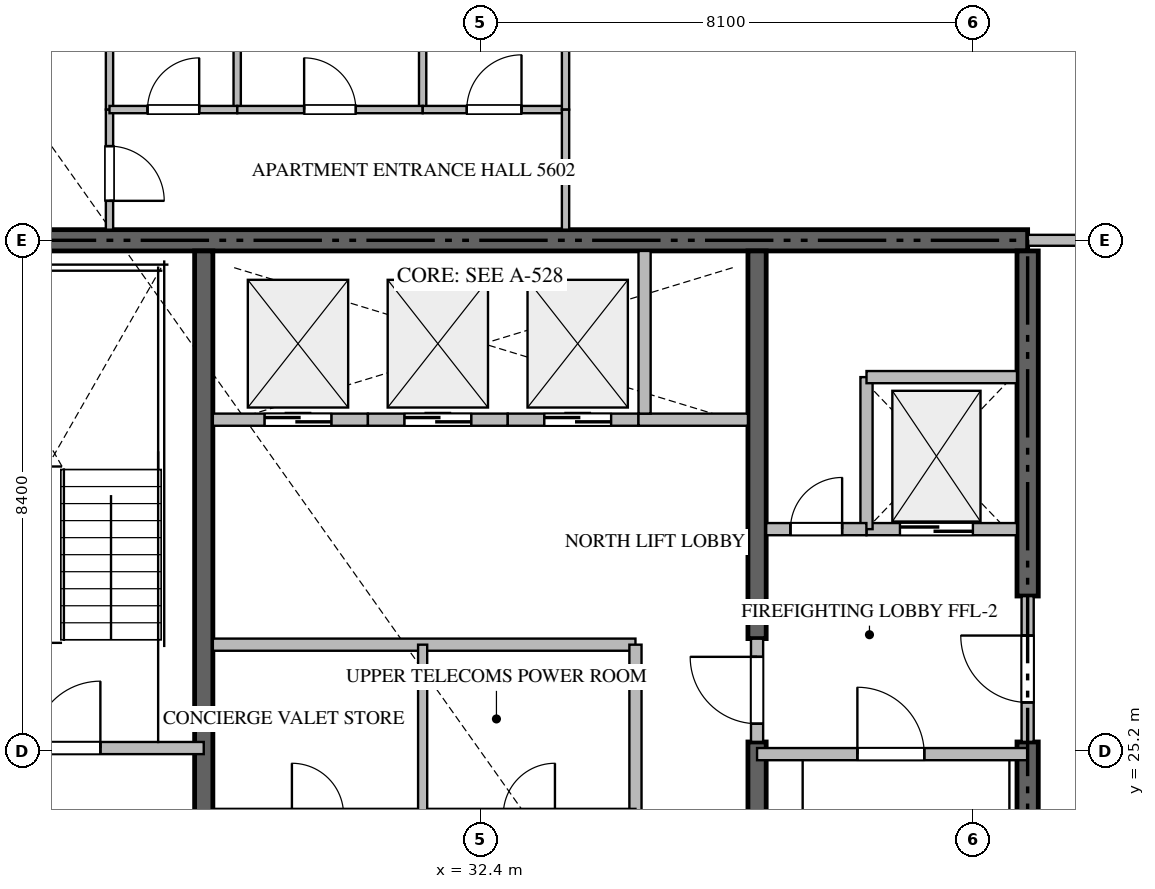
"""IFC4 building model, lengths in metres.
Left out: names, types, materials, properties, quantities, classifications, styles, units other than length and angle.
Written with IfcOpenShell. Run it as: python <this file> out.ifc"""

import sys

from ifc_helpers import new_model, si_unit, direction, frame, frame_2d, origin, place, context, subcontext, project, spatial, rectangle, extrude, source, transform, mapped, element, fill, save


model = new_model("IFC4")
c1 = context("Model", 3, precision=1e-05, world=origin(), true_north=direction((0.0, 1.0)))
c2 = subcontext(c1, "Body", "Model", "MODEL_VIEW")
j1 = project(units=[si_unit("LENGTHUNIT", "METRE"), si_unit("PLANEANGLEUNIT", "RADIAN")], contexts=[c1])
p1 = place(None, origin())
s1 = spatial("IfcSite", under=j1, at=p1, CompositionType="ELEMENT")
p2 = place(p1, origin())
s2 = spatial("IfcBuilding", under=s1, at=p2, CompositionType="ELEMENT")
p3 = place(p2, frame((0.0, 0.0, 225.85)))
s3 = spatial("IfcBuildingStorey", under=s2, at=p3, CompositionType="ELEMENT", Elevation=225.85)
p4 = place(p3, frame((41.4, 33.6, -0.26), z_axis=(0.0, 0.0, 1.0), x_axis=(-1.0, 0.0, 0.0)))
e1 = element("IfcWall", 1, at=p4, inside=s3, PredefinedType="SHEAR", context=c2, shape_type="SweptSolid", body=[
    extrude(rectangle(XDim=18.0, YDim=0.35, at=frame_2d((9.0, 0.0))), origin(), (0.0, 0.0, 1.0), 3.848),
])
p5 = place(p3, frame((41.4, 16.975, -0.26), z_axis=(0.0, 0.0, 1.0), x_axis=(0.0, 1.0, 0.0)))
e2 = element("IfcWall", 2, at=p5, inside=s3, PredefinedType="SHEAR", context=c2, shape_type="SweptSolid", body=[
    extrude(rectangle(XDim=8.375, YDim=0.35, at=frame_2d((4.188, 0.0))), origin(), (0.0, 0.0, 1.0), 3.848),
])
p6 = place(p3, frame((41.4, 27.75, -0.26), z_axis=(0.0, 0.0, 1.0), x_axis=(0.0, 1.0, 0.0)))
e3 = element("IfcWall", 3, at=p6, inside=s3, PredefinedType="SHEAR", context=c2, shape_type="SweptSolid", body=[
    extrude(rectangle(XDim=5.675, YDim=0.35, at=frame_2d((2.837, 0.0))), origin(), (0.0, 0.0, 1.0), 3.848),
])
p7 = place(p3, frame((27.85, 23.55, -0.26), z_axis=(0.0, 0.0, 1.0), x_axis=(0.0, 1.0, 0.0)))
e4 = element("IfcWall", 4, at=p7, inside=s3, PredefinedType="SHEAR", context=c2, shape_type="SweptSolid", body=[
    extrude(rectangle(XDim=9.875, YDim=0.3, at=frame_2d((4.938, 0.0))), origin(), (0.0, 0.0, 1.0), 3.848),
])
p8 = place(p3, frame((36.95, 16.975, -0.26), z_axis=(0.0, 0.0, 1.0), x_axis=(0.0, 1.0, 0.0)))
e5 = element("IfcWall", 5, at=p8, inside=s3, PredefinedType="SHEAR", context=c2, shape_type="SweptSolid", body=[
    extrude(rectangle(XDim=8.375, YDim=0.3, at=frame_2d((4.188, 0.0))), origin(), (0.0, 0.0, 1.0), 3.848),
])
p9 = place(p3, frame((36.95, 27.05, -0.26), z_axis=(0.0, 0.0, 1.0), x_axis=(0.0, 1.0, 0.0)))
e6 = element("IfcWall", 6, at=p9, inside=s3, PredefinedType="SHEAR", context=c2, shape_type="SweptSolid", body=[
    extrude(rectangle(XDim=6.375, YDim=0.3, at=frame_2d((3.188, 0.0))), origin(), (0.0, 0.0, 1.0), 3.848),
])
p10 = place(p3, frame((23.4, 25.25, 0.0), z_axis=(0.0, 0.0, 1.0), x_axis=(1.0, 0.0, 0.0)))
e7 = element("IfcWall", 7, at=p10, inside=s3, PredefinedType="STANDARD", context=c2, shape_type="SweptSolid", body=[
    extrude(rectangle(XDim=4.45, YDim=0.2, at=frame_2d((2.225, 0.0))), origin(), (0.0, 0.0, 1.0), 3.59),
])
p11 = place(p10, frame((1.65, 0.0, 0.0)))
e8 = element("IfcOpeningElement", 8, at=p11, cuts=e7, PredefinedType="OPENING", context=c2, shape_type="SweptSolid", body=[
    extrude(rectangle(XDim=1.1, YDim=2.15, at=frame_2d((0.55, 1.075))), frame((0.0, 0.11, 0.0), z_axis=(0.0, -1.0, 0.0), x_axis=(1.0, 0.0, 0.0)), (0.0, 0.0, 1.0), 0.22),
])
p12 = place(p3, frame((36.95, 25.15, 0.0), z_axis=(0.0, 0.0, 1.0), x_axis=(1.0, 0.0, 0.0)))
e9 = element("IfcWall", 9, at=p12, inside=s3, PredefinedType="STANDARD", context=c2, shape_type="SweptSolid", body=[
    extrude(rectangle(XDim=4.45, YDim=0.2, at=frame_2d((2.225, 0.0))), origin(), (0.0, 0.0, 1.0), 3.59),
])
p13 = place(p12, frame((1.65, 0.0, 0.0)))
e10 = element("IfcOpeningElement", 10, at=p13, cuts=e9, PredefinedType="OPENING", context=c2, shape_type="SweptSolid", body=[
    extrude(rectangle(XDim=1.1, YDim=2.15, at=frame_2d((0.55, 1.075))), frame((0.0, 0.11, 0.0), z_axis=(0.0, -1.0, 0.0), x_axis=(1.0, 0.0, 0.0)), (0.0, 0.0, 1.0), 0.22),
])
p14 = place(p3, frame((38.75, 28.85, 0.0), z_axis=(0.0, 0.0, 1.0), x_axis=(1.0, 0.0, 0.0)))
e11 = element("IfcWall", 11, at=p14, inside=s3, PredefinedType="STANDARD", context=c2, shape_type="SweptSolid", body=[
    extrude(rectangle(XDim=2.475, YDim=0.2, at=frame_2d((1.238, 0.0))), origin(), (0.0, 0.0, 1.0), 3.59),
])
p15 = place(p14, frame((0.55, 0.0, 0.0)))
e12 = element("IfcOpeningElement", 12, at=p15, cuts=e11, PredefinedType="OPENING", context=c2, shape_type="SweptSolid", body=[
    extrude(rectangle(XDim=1.2, YDim=2.2, at=frame_2d((0.6, 1.1))), frame((0.0, 0.11, 0.0), z_axis=(0.0, -1.0, 0.0), x_axis=(1.0, 0.0, 0.0)), (0.0, 0.0, 1.0), 0.22),
])
p16 = place(p3, frame((28.0, 30.65, 0.0), z_axis=(0.0, 0.0, 1.0), x_axis=(1.0, 0.0, 0.0)))
e13 = element("IfcWall", 13, at=p16, inside=s3, PredefinedType="STANDARD", context=c2, shape_type="SweptSolid", body=[
    extrude(rectangle(XDim=2.55, YDim=0.2, at=frame_2d((1.275, 0.0))), origin(), (0.0, 0.0, 1.0), 3.59),
])
p17 = place(p16, frame((0.85, 0.0, 0.0)))
e14 = element("IfcOpeningElement", 14, at=p17, cuts=e13, PredefinedType="OPENING", context=c2, shape_type="SweptSolid", body=[
    extrude(rectangle(XDim=1.1, YDim=2.2, at=frame_2d((0.55, 1.1))), frame((0.0, 0.11, 0.0), z_axis=(0.0, -1.0, 0.0), x_axis=(1.0, 0.0, 0.0)), (0.0, 0.0, 1.0), 0.22),
])
p18 = place(p3, frame((30.55, 30.65, 0.0), z_axis=(0.0, 0.0, 1.0), x_axis=(1.0, 0.0, 0.0)))
e15 = element("IfcWall", 15, at=p18, inside=s3, PredefinedType="STANDARD", context=c2, shape_type="SweptSolid", body=[
    extrude(rectangle(XDim=2.3, YDim=0.2, at=frame_2d((1.15, 0.0))), origin(), (0.0, 0.0, 1.0), 3.59),
])
p19 = place(p18, frame((0.6, 0.0, 0.0)))
e16 = element("IfcOpeningElement", 16, at=p19, cuts=e15, PredefinedType="OPENING", context=c2, shape_type="SweptSolid", body=[
    extrude(rectangle(XDim=1.1, YDim=2.2, at=frame_2d((0.55, 1.1))), frame((0.0, 0.11, 0.0), z_axis=(0.0, -1.0, 0.0), x_axis=(1.0, 0.0, 0.0)), (0.0, 0.0, 1.0), 0.22),
])
p20 = place(p3, frame((32.85, 30.65, 0.0), z_axis=(0.0, 0.0, 1.0), x_axis=(1.0, 0.0, 0.0)))
e17 = element("IfcWall", 17, at=p20, inside=s3, PredefinedType="STANDARD", context=c2, shape_type="SweptSolid", body=[
    extrude(rectangle(XDim=2.15, YDim=0.2, at=frame_2d((1.075, 0.0))), origin(), (0.0, 0.0, 1.0), 3.59),
])
p21 = place(p20, frame((0.6, 0.0, 0.0)))
e18 = element("IfcOpeningElement", 18, at=p21, cuts=e17, PredefinedType="OPENING", context=c2, shape_type="SweptSolid", body=[
    extrude(rectangle(XDim=1.1, YDim=2.2, at=frame_2d((0.55, 1.1))), frame((0.0, 0.11, 0.0), z_axis=(0.0, -1.0, 0.0), x_axis=(1.0, 0.0, 0.0)), (0.0, 0.0, 1.0), 0.22),
])
p22 = place(p3, frame((35.0, 30.65, 0.0), z_axis=(0.0, 0.0, 1.0), x_axis=(1.0, 0.0, 0.0)))
e19 = element("IfcWall", 19, at=p22, inside=s3, PredefinedType="STANDARD", context=c2, shape_type="SweptSolid", body=[
    extrude(rectangle(XDim=1.8, YDim=0.2, at=frame_2d((0.9, 0.0))), origin(), (0.0, 0.0, 1.0), 3.59),
])
p23 = place(p3, frame((35.1, 30.75, 0.0), z_axis=(0.0, 0.0, 1.0), x_axis=(0.0, 1.0, 0.0)))
e20 = element("IfcWall", 20, at=p23, inside=s3, PredefinedType="STANDARD", context=c2, shape_type="SweptSolid", body=[
    extrude(rectangle(XDim=2.675, YDim=0.2, at=frame_2d((1.337, 0.0))), origin(), (0.0, 0.0, 1.0), 3.59),
])
p24 = place(p3, frame((38.75, 28.85, 0.0), z_axis=(0.0, 0.0, 1.0), x_axis=(0.0, 1.0, 0.0)))
e21 = element("IfcWall", 21, at=p24, inside=s3, PredefinedType="STANDARD", context=c2, shape_type="SweptSolid", body=[
    extrude(rectangle(XDim=2.5, YDim=0.2, at=frame_2d((1.25, 0.0))), origin(), (0.0, 0.0, 1.0), 3.59),
])
p25 = place(p3, frame((38.75, 31.35, 0.0), z_axis=(0.0, 0.0, 1.0), x_axis=(1.0, 0.0, 0.0)))
e22 = element("IfcWall", 22, at=p25, inside=s3, PredefinedType="STANDARD", context=c2, shape_type="SweptSolid", body=[
    extrude(rectangle(XDim=2.475, YDim=0.2, at=frame_2d((1.238, 0.0))), origin(), (0.0, 0.0, 1.0), 3.59),
])
p26 = place(p3, frame((37.1, 28.85, 0.0), z_axis=(0.0, 0.0, 1.0), x_axis=(1.0, 0.0, 0.0)))
e23 = element("IfcWall", 23, at=p26, inside=s3, PredefinedType="STANDARD", context=c2, shape_type="SweptSolid", body=[
    extrude(rectangle(XDim=1.648, YDim=0.2, at=frame_2d((0.824, 0.0))), origin(), (0.0, 0.0, 1.0), 3.59),
])
p27 = place(p26, frame((0.399, 0.0, 0.0)))
e24 = element("IfcOpeningElement", 24, at=p27, cuts=e23, PredefinedType="OPENING", context=c2, shape_type="SweptSolid", body=[
    extrude(rectangle(XDim=0.85, YDim=2.1, at=frame_2d((0.425, 1.05))), frame((0.0, 0.11, 0.0), z_axis=(0.0, -1.0, 0.0), x_axis=(1.0, 0.0, 0.0)), (0.0, 0.0, 1.0), 0.22),
])
p28 = place(p3, frame((41.4, 25.352, 0.0), z_axis=(0.0, 0.0, 1.0), x_axis=(0.0, 1.0, 0.0)))
e25 = element("IfcWall", 25, at=p28, inside=s3, PredefinedType="STANDARD", context=c2, shape_type="SweptSolid", body=[
    extrude(rectangle(XDim=2.396, YDim=0.2, at=frame_2d((1.198, 0.0))), origin(), (0.0, 0.0, 1.0), 3.59),
])
p29 = place(p28, frame((0.648, 0.0, 0.0)))
e26 = element("IfcOpeningElement", 26, at=p29, cuts=e25, PredefinedType="OPENING", context=c2, shape_type="SweptSolid", body=[
    extrude(rectangle(XDim=1.1, YDim=2.15, at=frame_2d((0.55, 1.075))), frame((0.0, 0.11, 0.0), z_axis=(0.0, -1.0, 0.0), x_axis=(1.0, 0.0, 0.0)), (0.0, 0.0, 1.0), 0.22),
])
p30 = place(p3, frame((36.95, 25.352, 0.0), z_axis=(0.0, 0.0, 1.0), x_axis=(0.0, 1.0, 0.0)))
e27 = element("IfcWall", 27, at=p30, inside=s3, PredefinedType="STANDARD", context=c2, shape_type="SweptSolid", body=[
    extrude(rectangle(XDim=1.696, YDim=0.2, at=frame_2d((0.848, 0.0))), origin(), (0.0, 0.0, 1.0), 3.59),
])
p31 = place(p30, frame((0.298, 0.0, 0.0)))
e28 = element("IfcOpeningElement", 28, at=p31, cuts=e27, PredefinedType="OPENING", context=c2, shape_type="SweptSolid", body=[
    extrude(rectangle(XDim=1.1, YDim=2.15, at=frame_2d((0.55, 1.075))), frame((0.0, 0.11, 0.0), z_axis=(0.0, -1.0, 0.0), x_axis=(1.0, 0.0, 0.0)), (0.0, 0.0, 1.0), 0.22),
])
p32 = place(p3, frame((28.0, 26.95, 0.0), z_axis=(0.0, 0.0, 1.0), x_axis=(1.0, 0.0, 0.0)))
e29 = element("IfcWall", 29, at=p32, inside=s3, PredefinedType="STANDARD", context=c2, shape_type="SweptSolid", body=[
    extrude(rectangle(XDim=6.95, YDim=0.2, at=frame_2d((3.475, 0.0))), origin(), (0.0, 0.0, 1.0), 3.59),
])
p33 = place(p3, frame((34.95, 24.15, 0.0), z_axis=(0.0, 0.0, 1.0), x_axis=(0.0, 1.0, 0.0)))
e30 = element("IfcWall", 30, at=p33, inside=s3, PredefinedType="STANDARD", context=c2, shape_type="SweptSolid", body=[
    extrude(rectangle(XDim=2.8, YDim=0.2, at=frame_2d((1.4, 0.0))), origin(), (0.0, 0.0, 1.0), 3.59),
])
p34 = place(p3, frame((31.45, 24.15, 0.0), z_axis=(0.0, 0.0, 1.0), x_axis=(0.0, 1.0, 0.0)))
e31 = element("IfcWall", 31, at=p34, inside=s3, PredefinedType="PARTITIONING", context=c2, shape_type="SweptSolid", body=[
    extrude(rectangle(XDim=2.8, YDim=0.15, at=frame_2d((1.4, 0.0))), origin(), (0.0, 0.0, 1.0), 3.59),
])
p35 = place(p3, frame((41.402, 33.6, 0.0), z_axis=(0.0, 0.0, 1.0), x_axis=(1.0, 0.0, 0.0)))
e32 = element("IfcWall", 32, at=p35, inside=s3, PredefinedType="PARTITIONING", context=c2, shape_type="SweptSolid", body=[
    extrude(rectangle(XDim=2.496, YDim=0.18, at=frame_2d((1.248, 0.0))), origin(), (0.0, 0.0, 1.0), 3.59),
])
p36 = place(p3, frame((26.3, 35.75, 0.0), z_axis=(0.0, 0.0, 1.0), x_axis=(0.0, -1.0, 0.0)))
e33 = element("IfcWall", 33, at=p36, inside=s3, PredefinedType="PARTITIONING", context=c2, shape_type="SweptSolid", body=[
    extrude(rectangle(XDim=1.975, YDim=0.12, at=frame_2d((0.988, 0.0))), origin(), (0.0, 0.0, 1.0), 3.59),
])
p37 = place(p36, frame((0.601, 0.0, 0.0)))
e34 = element("IfcOpeningElement", 34, at=p37, cuts=e33, PredefinedType="OPENING", context=c2, shape_type="SweptSolid", body=[
    extrude(rectangle(XDim=0.9, YDim=2.1, at=frame_2d((0.45, 1.05))), frame((0.0, 0.07, 0.0), z_axis=(0.0, -1.0, 0.0), x_axis=(1.0, 0.0, 0.0)), (0.0, 0.0, 1.0), 0.14),
])
p38 = place(p3, frame((26.3, 42.248, 0.0), z_axis=(0.0, 0.0, 1.0), x_axis=(0.0, -1.0, 0.0)))
e35 = element("IfcWall", 35, at=p38, inside=s3, PredefinedType="PARTITIONING", context=c2, shape_type="SweptSolid", body=[
    extrude(rectangle(XDim=6.496, YDim=0.12, at=frame_2d((3.248, 0.0))), origin(), (0.0, 0.0, 1.0), 3.59),
])
p39 = place(p3, frame((31.45, 49.105, 0.0), z_axis=(0.0, 0.0, 1.0), x_axis=(0.0, -1.0, 0.0)))
e36 = element("IfcWall", 36, at=p39, inside=s3, PredefinedType="PARTITIONING", context=c2, shape_type="SweptSolid", body=[
    extrude(rectangle(XDim=13.355, YDim=0.12, at=frame_2d((6.677, 0.0))), origin(), (0.0, 0.0, 1.0), 3.59),
])
p40 = place(p3, frame((28.4, 42.25, 0.0), z_axis=(0.0, 0.0, 1.0), x_axis=(0.0, -1.0, 0.0)))
e37 = element("IfcWall", 37, at=p40, inside=s3, PredefinedType="PARTITIONING", context=c2, shape_type="SweptSolid", body=[
    extrude(rectangle(XDim=6.5, YDim=0.12, at=frame_2d((3.25, 0.0))), origin(), (0.0, 0.0, 1.0), 3.59),
])
p41 = place(p3, frame((26.3, 35.75, 0.0), z_axis=(0.0, 0.0, 1.0), x_axis=(1.0, 0.0, 0.0)))
e38 = element("IfcWall", 38, at=p41, inside=s3, PredefinedType="PARTITIONING", context=c2, shape_type="SweptSolid", body=[
    extrude(rectangle(XDim=2.1, YDim=0.12, at=frame_2d((1.05, 0.0))), origin(), (0.0, 0.0, 1.0), 3.59),
])
p42 = place(p41, frame((0.625, 0.0, 0.0)))
e39 = element("IfcOpeningElement", 39, at=p42, cuts=e38, PredefinedType="OPENING", context=c2, shape_type="SweptSolid", body=[
    extrude(rectangle(XDim=0.85, YDim=2.1, at=frame_2d((0.425, 1.05))), frame((0.0, 0.07, 0.0), z_axis=(0.0, -1.0, 0.0), x_axis=(1.0, 0.0, 0.0)), (0.0, 0.0, 1.0), 0.14),
])
p43 = place(p3, frame((28.402, 35.75, 0.0), z_axis=(0.0, 0.0, 1.0), x_axis=(1.0, 0.0, 0.0)))
e40 = element("IfcWall", 40, at=p43, inside=s3, PredefinedType="PARTITIONING", context=c2, shape_type="SweptSolid", body=[
    extrude(rectangle(XDim=3.048, YDim=0.12, at=frame_2d((1.524, 0.0))), origin(), (0.0, 0.0, 1.0), 3.59),
])
p44 = place(p43, frame((1.099, 0.0, 0.0)))
e41 = element("IfcOpeningElement", 41, at=p44, cuts=e40, PredefinedType="OPENING", context=c2, shape_type="SweptSolid", body=[
    extrude(rectangle(XDim=0.85, YDim=2.1, at=frame_2d((0.425, 1.05))), frame((0.0, 0.07, 0.0), z_axis=(0.0, -1.0, 0.0), x_axis=(1.0, 0.0, 0.0)), (0.0, 0.0, 1.0), 0.14),
])
p45 = place(p3, frame((31.452, 35.75, 0.0), z_axis=(0.0, 0.0, 1.0), x_axis=(1.0, 0.0, 0.0)))
e42 = element("IfcWall", 42, at=p45, inside=s3, PredefinedType="PARTITIONING", context=c2, shape_type="SweptSolid", body=[
    extrude(rectangle(XDim=2.348, YDim=0.12, at=frame_2d((1.174, 0.0))), origin(), (0.0, 0.0, 1.0), 3.59),
])
p46 = place(p45, frame((0.724, 0.0, 0.0)))
e43 = element("IfcOpeningElement", 43, at=p46, cuts=e42, PredefinedType="OPENING", context=c2, shape_type="SweptSolid", body=[
    extrude(rectangle(XDim=0.9, YDim=2.1, at=frame_2d((0.45, 1.05))), frame((0.0, 0.07, 0.0), z_axis=(0.0, -1.0, 0.0), x_axis=(1.0, 0.0, 0.0)), (0.0, 0.0, 1.0), 0.14),
])
p47 = place(p3, frame((33.8, 41.81, 0.0), z_axis=(0.0, 0.0, 1.0), x_axis=(0.0, -1.0, 0.0)))
e44 = element("IfcWall", 44, at=p47, inside=s3, PredefinedType="PARTITIONING", context=c2, shape_type="SweptSolid", body=[
    extrude(rectangle(XDim=6.06, YDim=0.12, at=frame_2d((3.03, 0.0))), origin(), (0.0, 0.0, 1.0), 3.59),
])
p48 = place(p47, frame((2.605, 0.0, 0.0)))
e45 = element("IfcOpeningElement", 45, at=p48, cuts=e44, PredefinedType="OPENING", context=c2, shape_type="SweptSolid", body=[
    extrude(rectangle(XDim=0.85, YDim=2.1, at=frame_2d((0.425, 1.05))), frame((0.0, 0.07, 0.0), z_axis=(0.0, -1.0, 0.0), x_axis=(1.0, 0.0, 0.0)), (0.0, 0.0, 1.0), 0.14),
])
p49 = place(p3, frame((33.8, 35.748, 0.0), z_axis=(0.0, 0.0, 1.0), x_axis=(0.0, -1.0, 0.0)))
e46 = element("IfcWall", 46, at=p49, inside=s3, PredefinedType="PARTITIONING", context=c2, shape_type="SweptSolid", body=[
    extrude(rectangle(XDim=1.973, YDim=0.12, at=frame_2d((0.987, 0.0))), origin(), (0.0, 0.0, 1.0), 3.59),
])
m1 = source(origin(), c2, "Body", "SweptSolid", [
    extrude(rectangle(XDim=1.1, YDim=2.15, at=frame_2d((0.55, 1.075))), frame((0.0, 0.025, 0.0), z_axis=(0.0, -1.0, 0.0), x_axis=(1.0, 0.0, 0.0)), (0.0, 0.0, 1.0), 0.05),
])
p50 = place(p11, origin())
e47 = element("IfcDoor", 47, at=p50, inside=s3, OperationType="SINGLE_SWING_RIGHT", PredefinedType="DOOR", context=c2, shape_type="MappedRepresentation", body=[
    mapped(m1, transform((0.0, 0.0, 0.0), scale=1.0)),
])
fill(e8, e47)
p51 = place(p13, origin())
e48 = element("IfcDoor", 48, at=p51, inside=s3, OperationType="SINGLE_SWING_LEFT", PredefinedType="DOOR", context=c2, shape_type="MappedRepresentation", body=[
    mapped(m1, transform((0.0, 0.0, 0.0), scale=1.0)),
])
fill(e10, e48)
m2 = source(origin(), c2, "Body", "SweptSolid", [
    extrude(rectangle(XDim=1.2, YDim=2.2, at=frame_2d((0.6, 1.1))), frame((0.0, 0.025, 0.0), z_axis=(0.0, -1.0, 0.0), x_axis=(1.0, 0.0, 0.0)), (0.0, 0.0, 1.0), 0.05),
])
p52 = place(p15, origin())
e49 = element("IfcDoor", 49, at=p52, inside=s3, OperationType="DOUBLE_DOOR_SLIDING", PredefinedType="DOOR", context=c2, shape_type="MappedRepresentation", body=[
    mapped(m2, transform((0.0, 0.0, 0.0), scale=1.0)),
])
fill(e12, e49)
m3 = source(origin(), c2, "Body", "SweptSolid", [
    extrude(rectangle(XDim=1.1, YDim=2.2, at=frame_2d((0.55, 1.1))), frame((0.0, 0.025, 0.0), z_axis=(0.0, -1.0, 0.0), x_axis=(1.0, 0.0, 0.0)), (0.0, 0.0, 1.0), 0.05),
])
p53 = place(p17, origin())
e50 = element("IfcDoor", 50, at=p53, inside=s3, OperationType="DOUBLE_DOOR_SLIDING", PredefinedType="DOOR", context=c2, shape_type="MappedRepresentation", body=[
    mapped(m3, transform((0.0, 0.0, 0.0), scale=1.0)),
])
fill(e14, e50)
p54 = place(p19, origin())
e51 = element("IfcDoor", 51, at=p54, inside=s3, OperationType="DOUBLE_DOOR_SLIDING", PredefinedType="DOOR", context=c2, shape_type="MappedRepresentation", body=[
    mapped(m3, transform((0.0, 0.0, 0.0), scale=1.0)),
])
fill(e16, e51)
p55 = place(p21, origin())
e52 = element("IfcDoor", 52, at=p55, inside=s3, OperationType="DOUBLE_DOOR_SLIDING", PredefinedType="DOOR", context=c2, shape_type="MappedRepresentation", body=[
    mapped(m3, transform((0.0, 0.0, 0.0), scale=1.0)),
])
fill(e18, e52)
m4 = source(origin(), c2, "Body", "SweptSolid", [
    extrude(rectangle(XDim=0.85, YDim=2.1, at=frame_2d((0.425, 1.05))), frame((0.0, 0.025, 0.0), z_axis=(0.0, -1.0, 0.0), x_axis=(1.0, 0.0, 0.0)), (0.0, 0.0, 1.0), 0.05),
])
p56 = place(p27, origin())
e53 = element("IfcDoor", 53, at=p56, inside=s3, OperationType="SINGLE_SWING_RIGHT", PredefinedType="DOOR", context=c2, shape_type="MappedRepresentation", body=[
    mapped(m4, transform((0.0, 0.0, 0.0), scale=1.0)),
])
fill(e24, e53)
p57 = place(p29, origin())
e54 = element("IfcDoor", 54, at=p57, inside=s3, OperationType="SINGLE_SWING_RIGHT", PredefinedType="DOOR", context=c2, shape_type="MappedRepresentation", body=[
    mapped(m1, transform((0.0, 0.0, 0.0), scale=1.0)),
])
fill(e26, e54)
p58 = place(p31, origin())
e55 = element("IfcDoor", 55, at=p58, inside=s3, OperationType="SINGLE_SWING_RIGHT", PredefinedType="DOOR", context=c2, shape_type="MappedRepresentation", body=[
    mapped(m1, transform((0.0, 0.0, 0.0), scale=1.0)),
])
fill(e28, e55)
m5 = source(origin(), c2, "Body", "SweptSolid", [
    extrude(rectangle(XDim=0.9, YDim=2.1, at=frame_2d((0.45, 1.05))), frame((0.0, 0.025, 0.0), z_axis=(0.0, -1.0, 0.0), x_axis=(1.0, 0.0, 0.0)), (0.0, 0.0, 1.0), 0.05),
])
p59 = place(p37, origin())
e56 = element("IfcDoor", 56, at=p59, inside=s3, OperationType="SINGLE_SWING_RIGHT", PredefinedType="DOOR", context=c2, shape_type="MappedRepresentation", body=[
    mapped(m5, transform((0.0, 0.0, 0.0), scale=1.0)),
])
fill(e34, e56)
p60 = place(p42, origin())
e57 = element("IfcDoor", 57, at=p60, inside=s3, OperationType="SINGLE_SWING_RIGHT", PredefinedType="DOOR", context=c2, shape_type="MappedRepresentation", body=[
    mapped(m4, transform((0.0, 0.0, 0.0), scale=1.0)),
])
fill(e39, e57)
p61 = place(p44, origin())
e58 = element("IfcDoor", 58, at=p61, inside=s3, OperationType="SINGLE_SWING_LEFT", PredefinedType="DOOR", context=c2, shape_type="MappedRepresentation", body=[
    mapped(m4, transform((0.0, 0.0, 0.0), scale=1.0)),
])
fill(e41, e58)
p62 = place(p46, origin())
e59 = element("IfcDoor", 59, at=p62, inside=s3, OperationType="SINGLE_SWING_RIGHT", PredefinedType="DOOR", context=c2, shape_type="MappedRepresentation", body=[
    mapped(m5, transform((0.0, 0.0, 0.0), scale=1.0)),
])
fill(e43, e59)
save(model, sys.argv[1])
